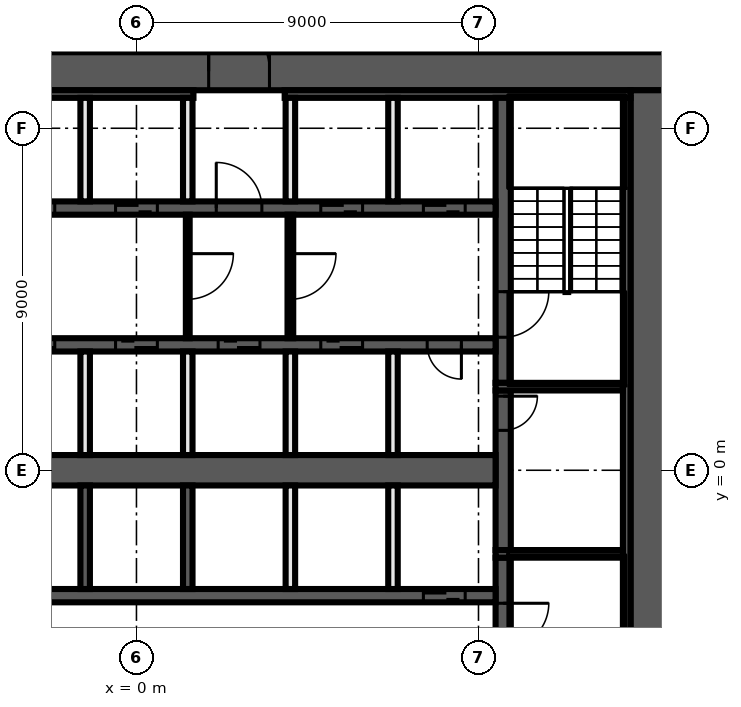
"""IFC4 building model, lengths in metres.
Left out: names, types, materials, properties, quantities, classifications, styles, units other than length and angle.
Written with IfcOpenShell. Run it as: python <this file> out.ifc"""

import sys

from ifc_helpers import new_model, si_unit, direction, frame, frame_2d, origin, place, context, subcontext, project, spatial, rectangle, extrude, element, fill, save


model = new_model("IFC4")
c1 = context("Model", 3, precision=1e-05, world=origin(), true_north=direction((0.0, 1.0)))
c2 = subcontext(c1, "Body", "Model", "MODEL_VIEW")
j1 = project(units=[si_unit("LENGTHUNIT", "METRE"), si_unit("PLANEANGLEUNIT", "RADIAN")], contexts=[c1])
p1 = place(None, origin())
s1 = spatial("IfcSite", under=j1, at=p1, CompositionType="ELEMENT")
p2 = place(p1, origin())
s2 = spatial("IfcBuilding", under=s1, at=p2, CompositionType="ELEMENT")
p3 = place(p2, frame((0.0, 0.0, 145.6)))
s3 = spatial("IfcBuildingStorey", under=s2, at=p3, CompositionType="ELEMENT", Elevation=145.6)
p4 = place(p3, frame((-14.0, 10.5, 0.0), z_axis=(0.0, 0.0, 1.0), x_axis=(1.0, 0.0, 0.0)))
e1 = element("IfcWall", 1, at=p4, inside=s3, PredefinedType="SHEAR", context=c2, shape_type="SweptSolid", body=[
    extrude(rectangle(XDim=28.0, YDim=1.0, at=frame_2d((14.0, 0.0))), origin(), (0.0, 0.0, 1.0), 5.55),
])
p5 = place(p4, frame((15.9, 0.0, 0.0)))
e2 = element("IfcOpeningElement", 2, at=p5, cuts=e1, PredefinedType="OPENING", context=c2, shape_type="SweptSolid", body=[
    extrude(rectangle(XDim=1.6, YDim=2.1, at=frame_2d((0.8, 1.05))), frame((0.0, 0.51, 0.0), z_axis=(0.0, -1.0, 0.0), x_axis=(1.0, 0.0, 0.0)), (0.0, 0.0, 1.0), 1.02),
])
p6 = place(p3, frame((13.5, 10.0, 0.0), z_axis=(0.0, 0.0, 1.0), x_axis=(0.0, -1.0, 0.0)))
e3 = element("IfcWall", 3, at=p6, inside=s3, PredefinedType="SHEAR", context=c2, shape_type="SweptSolid", body=[
    extrude(rectangle(XDim=20.0, YDim=1.0, at=frame_2d((10.0, 0.0))), origin(), (0.0, 0.0, 1.0), 5.55),
])
p7 = place(p3, frame((-13.0, 9.9, 0.0), z_axis=(0.0, 0.0, 1.0), x_axis=(1.0, 0.0, 0.0)))
e4 = element("IfcWall", 4, at=p7, inside=s3, PredefinedType="SHEAR", context=c2, shape_type="SweptSolid", body=[
    extrude(rectangle(XDim=14.5, YDim=0.2, at=frame_2d((7.25, 0.0))), origin(), (0.0, 0.0, 1.0), 5.55),
])
p8 = place(p3, frame((3.9, 9.9, 0.0), z_axis=(0.0, 0.0, 1.0), x_axis=(1.0, 0.0, 0.0)))
e5 = element("IfcWall", 5, at=p8, inside=s3, PredefinedType="SHEAR", context=c2, shape_type="SweptSolid", body=[
    extrude(rectangle(XDim=9.1, YDim=0.2, at=frame_2d((4.55, 0.0))), origin(), (0.0, 0.0, 1.0), 5.55),
])
p9 = place(p3, frame((12.9, 9.8, 0.0), z_axis=(0.0, 0.0, 1.0), x_axis=(0.0, -1.0, 0.0)))
e6 = element("IfcWall", 6, at=p9, inside=s3, PredefinedType="SHEAR", context=c2, shape_type="SweptSolid", body=[
    extrude(rectangle(XDim=19.6, YDim=0.2, at=frame_2d((9.8, 0.0))), origin(), (0.0, 0.0, 1.0), 5.55),
])
p10 = place(p3, frame((9.65, -2.3, 0.0), z_axis=(0.0, 0.0, 1.0), x_axis=(0.0, -1.0, 0.0)))
e7 = element("IfcWall", 7, at=p10, inside=s3, PredefinedType="SHEAR", context=c2, shape_type="SweptSolid", body=[
    extrude(rectangle(XDim=7.5, YDim=0.4, at=frame_2d((3.75, 0.0))), origin(), (0.0, 0.0, 1.0), 5.55),
])
p11 = place(p10, frame((1.2, 0.0, 0.0)))
e8 = element("IfcOpeningElement", 8, at=p11, cuts=e7, PredefinedType="OPENING", context=c2, shape_type="SweptSolid", body=[
    extrude(rectangle(XDim=1.2, YDim=2.1, at=frame_2d((0.6, 1.05))), frame((0.0, 0.21, 0.0), z_axis=(0.0, -1.0, 0.0), x_axis=(1.0, 0.0, 0.0)), (0.0, 0.0, 1.0), 0.42),
])
p12 = place(p3, frame((9.65, 2.1, 0.0), z_axis=(0.0, 0.0, 1.0), x_axis=(0.0, -1.0, 0.0)))
e9 = element("IfcWall", 9, at=p12, inside=s3, PredefinedType="SHEAR", context=c2, shape_type="SweptSolid", body=[
    extrude(rectangle(XDim=4.2, YDim=0.4, at=frame_2d((2.1, 0.0))), origin(), (0.0, 0.0, 1.0), 5.55),
])
p13 = place(p12, frame((0.15, 0.0, 0.0)))
e10 = element("IfcOpeningElement", 10, at=p13, cuts=e9, PredefinedType="OPENING", context=c2, shape_type="SweptSolid", body=[
    extrude(rectangle(XDim=0.9, YDim=2.1, at=frame_2d((0.45, 1.05))), frame((0.0, 0.21, 0.0), z_axis=(0.0, -1.0, 0.0), x_axis=(1.0, 0.0, 0.0)), (0.0, 0.0, 1.0), 0.42),
])
p14 = place(p3, frame((9.65, 9.8, 0.0), z_axis=(0.0, 0.0, 1.0), x_axis=(0.0, -1.0, 0.0)))
e11 = element("IfcWall", 11, at=p14, inside=s3, PredefinedType="SHEAR", context=c2, shape_type="SweptSolid", body=[
    extrude(rectangle(XDim=7.5, YDim=0.4, at=frame_2d((3.75, 0.0))), origin(), (0.0, 0.0, 1.0), 5.55),
])
p15 = place(p14, frame((5.1, 0.0, 0.0)))
e12 = element("IfcOpeningElement", 12, at=p15, cuts=e11, PredefinedType="OPENING", context=c2, shape_type="SweptSolid", body=[
    extrude(rectangle(XDim=1.2, YDim=2.1, at=frame_2d((0.6, 1.05))), frame((0.0, 0.21, 0.0), z_axis=(0.0, -1.0, 0.0), x_axis=(1.0, 0.0, 0.0)), (0.0, 0.0, 1.0), 0.42),
])
for number, where, z_axis, x_axis in (
    (13, (9.45, 2.2, 0.0), (0.0, 0.0, 1.0), (1.0, 0.0, 0.0)),
    (14, (9.45, -2.2, 0.0), (0.0, 0.0, 1.0), (1.0, 0.0, 0.0)),
):
    element("IfcWall", number, at=place(p3, frame(where, z_axis=z_axis, x_axis=x_axis)), inside=s3, PredefinedType="SHEAR", context=c2, shape_type="SweptSolid", body=[
        extrude(rectangle(XDim=3.35, YDim=0.2, at=frame_2d((1.675, 0.0))), origin(), (0.0, 0.0, 1.0), 5.55),
    ])
p16 = place(p3, frame((-9.45, 6.9, 0.0), z_axis=(0.0, 0.0, 1.0), x_axis=(1.0, 0.0, 0.0)))
e15 = element("IfcWall", 15, at=p16, inside=s3, PredefinedType="SHEAR", context=c2, shape_type="SweptSolid", body=[
    extrude(rectangle(XDim=18.9, YDim=0.35, at=frame_2d((9.45, 0.0))), origin(), (0.0, 0.0, 1.0), 5.55),
])
p17 = place(p16, frame((0.8, 0.0, 0.0)))
e16 = element("IfcOpeningElement", 16, at=p17, cuts=e15, PredefinedType="OPENING", context=c2, shape_type="SweptSolid", body=[
    extrude(rectangle(XDim=1.1, YDim=2.1, at=frame_2d((0.55, 1.05))), frame((0.0, 0.185, 0.0), z_axis=(0.0, -1.0, 0.0), x_axis=(1.0, 0.0, 0.0)), (0.0, 0.0, 1.0), 0.37),
])
p18 = place(p16, frame((3.5, 0.0, 0.0)))
e17 = element("IfcOpeningElement", 17, at=p18, cuts=e15, PredefinedType="OPENING", context=c2, shape_type="SweptSolid", body=[
    extrude(rectangle(XDim=1.1, YDim=2.1, at=frame_2d((0.55, 1.05))), frame((0.0, 0.185, 0.0), z_axis=(0.0, -1.0, 0.0), x_axis=(1.0, 0.0, 0.0)), (0.0, 0.0, 1.0), 0.37),
])
p19 = place(p16, frame((6.2, 0.0, 0.0)))
e18 = element("IfcOpeningElement", 18, at=p19, cuts=e15, PredefinedType="OPENING", context=c2, shape_type="SweptSolid", body=[
    extrude(rectangle(XDim=1.1, YDim=2.1, at=frame_2d((0.55, 1.05))), frame((0.0, 0.185, 0.0), z_axis=(0.0, -1.0, 0.0), x_axis=(1.0, 0.0, 0.0)), (0.0, 0.0, 1.0), 0.37),
])
p20 = place(p16, frame((8.9, 0.0, 0.0)))
e19 = element("IfcOpeningElement", 19, at=p20, cuts=e15, PredefinedType="OPENING", context=c2, shape_type="SweptSolid", body=[
    extrude(rectangle(XDim=1.1, YDim=2.1, at=frame_2d((0.55, 1.05))), frame((0.0, 0.185, 0.0), z_axis=(0.0, -1.0, 0.0), x_axis=(1.0, 0.0, 0.0)), (0.0, 0.0, 1.0), 0.37),
])
p21 = place(p16, frame((11.55, 0.0, 0.0)))
e20 = element("IfcOpeningElement", 20, at=p21, cuts=e15, PredefinedType="OPENING", context=c2, shape_type="SweptSolid", body=[
    extrude(rectangle(XDim=1.2, YDim=2.1, at=frame_2d((0.6, 1.05))), frame((0.0, 0.185, 0.0), z_axis=(0.0, -1.0, 0.0), x_axis=(1.0, 0.0, 0.0)), (0.0, 0.0, 1.0), 0.37),
])
p22 = place(p16, frame((14.3, 0.0, 0.0)))
e21 = element("IfcOpeningElement", 21, at=p22, cuts=e15, PredefinedType="OPENING", context=c2, shape_type="SweptSolid", body=[
    extrude(rectangle(XDim=1.1, YDim=2.1, at=frame_2d((0.55, 1.05))), frame((0.0, 0.185, 0.0), z_axis=(0.0, -1.0, 0.0), x_axis=(1.0, 0.0, 0.0)), (0.0, 0.0, 1.0), 0.37),
])
p23 = place(p16, frame((17.0, 0.0, 0.0)))
e22 = element("IfcOpeningElement", 22, at=p23, cuts=e15, PredefinedType="OPENING", context=c2, shape_type="SweptSolid", body=[
    extrude(rectangle(XDim=1.1, YDim=2.1, at=frame_2d((0.55, 1.05))), frame((0.0, 0.185, 0.0), z_axis=(0.0, -1.0, 0.0), x_axis=(1.0, 0.0, 0.0)), (0.0, 0.0, 1.0), 0.37),
])
p24 = place(p3, frame((9.45, 3.3, 0.0), z_axis=(0.0, 0.0, 1.0), x_axis=(-1.0, 0.0, 0.0)))
e23 = element("IfcWall", 23, at=p24, inside=s3, PredefinedType="SHEAR", context=c2, shape_type="SweptSolid", body=[
    extrude(rectangle(XDim=18.9, YDim=0.35, at=frame_2d((9.45, 0.0))), origin(), (0.0, 0.0, 1.0), 5.55),
])
p25 = place(p24, frame((17.0, 0.0, 0.0)))
e24 = element("IfcOpeningElement", 24, at=p25, cuts=e23, PredefinedType="OPENING", context=c2, shape_type="SweptSolid", body=[
    extrude(rectangle(XDim=1.1, YDim=2.1, at=frame_2d((0.55, 1.05))), frame((0.0, 0.185, 0.0), z_axis=(0.0, -1.0, 0.0), x_axis=(1.0, 0.0, 0.0)), (0.0, 0.0, 1.0), 0.37),
])
p26 = place(p24, frame((14.3, 0.0, 0.0)))
e25 = element("IfcOpeningElement", 25, at=p26, cuts=e23, PredefinedType="OPENING", context=c2, shape_type="SweptSolid", body=[
    extrude(rectangle(XDim=1.1, YDim=2.1, at=frame_2d((0.55, 1.05))), frame((0.0, 0.185, 0.0), z_axis=(0.0, -1.0, 0.0), x_axis=(1.0, 0.0, 0.0)), (0.0, 0.0, 1.0), 0.37),
])
p27 = place(p24, frame((11.6, 0.0, 0.0)))
e26 = element("IfcOpeningElement", 26, at=p27, cuts=e23, PredefinedType="OPENING", context=c2, shape_type="SweptSolid", body=[
    extrude(rectangle(XDim=1.1, YDim=2.1, at=frame_2d((0.55, 1.05))), frame((0.0, 0.185, 0.0), z_axis=(0.0, -1.0, 0.0), x_axis=(1.0, 0.0, 0.0)), (0.0, 0.0, 1.0), 0.37),
])
p28 = place(p24, frame((8.9, 0.0, 0.0)))
e27 = element("IfcOpeningElement", 27, at=p28, cuts=e23, PredefinedType="OPENING", context=c2, shape_type="SweptSolid", body=[
    extrude(rectangle(XDim=1.1, YDim=2.1, at=frame_2d((0.55, 1.05))), frame((0.0, 0.185, 0.0), z_axis=(0.0, -1.0, 0.0), x_axis=(1.0, 0.0, 0.0)), (0.0, 0.0, 1.0), 0.37),
])
p29 = place(p24, frame((6.2, 0.0, 0.0)))
e28 = element("IfcOpeningElement", 28, at=p29, cuts=e23, PredefinedType="OPENING", context=c2, shape_type="SweptSolid", body=[
    extrude(rectangle(XDim=1.1, YDim=2.1, at=frame_2d((0.55, 1.05))), frame((0.0, 0.185, 0.0), z_axis=(0.0, -1.0, 0.0), x_axis=(1.0, 0.0, 0.0)), (0.0, 0.0, 1.0), 0.37),
])
p30 = place(p24, frame((3.5, 0.0, 0.0)))
e29 = element("IfcOpeningElement", 29, at=p30, cuts=e23, PredefinedType="OPENING", context=c2, shape_type="SweptSolid", body=[
    extrude(rectangle(XDim=1.1, YDim=2.1, at=frame_2d((0.55, 1.05))), frame((0.0, 0.185, 0.0), z_axis=(0.0, -1.0, 0.0), x_axis=(1.0, 0.0, 0.0)), (0.0, 0.0, 1.0), 0.37),
])
p31 = place(p24, frame((0.9, 0.0, 0.0)))
e30 = element("IfcOpeningElement", 30, at=p31, cuts=e23, PredefinedType="OPENING", context=c2, shape_type="SweptSolid", body=[
    extrude(rectangle(XDim=0.9, YDim=2.1, at=frame_2d((0.45, 1.05))), frame((0.0, 0.185, 0.0), z_axis=(0.0, -1.0, 0.0), x_axis=(1.0, 0.0, 0.0)), (0.0, 0.0, 1.0), 0.37),
])
p32 = place(p3, frame((-9.45, -3.3, 0.0), z_axis=(0.0, 0.0, 1.0), x_axis=(1.0, 0.0, 0.0)))
e31 = element("IfcWall", 31, at=p32, inside=s3, PredefinedType="SHEAR", context=c2, shape_type="SweptSolid", body=[
    extrude(rectangle(XDim=18.9, YDim=0.35, at=frame_2d((9.45, 0.0))), origin(), (0.0, 0.0, 1.0), 5.55),
])
p33 = place(p32, frame((17.0, 0.0, 0.0)))
e32 = element("IfcOpeningElement", 32, at=p33, cuts=e31, PredefinedType="OPENING", context=c2, shape_type="SweptSolid", body=[
    extrude(rectangle(XDim=1.1, YDim=2.1, at=frame_2d((0.55, 1.05))), frame((0.0, 0.185, 0.0), z_axis=(0.0, -1.0, 0.0), x_axis=(1.0, 0.0, 0.0)), (0.0, 0.0, 1.0), 0.37),
])
p34 = place(p3, frame((-9.45, 0.0, 0.0), z_axis=(0.0, 0.0, 1.0), x_axis=(1.0, 0.0, 0.0)))
e33 = element("IfcWall", 33, at=p34, inside=s3, PredefinedType="SHEAR", context=c2, shape_type="SweptSolid", body=[
    extrude(rectangle(XDim=18.9, YDim=0.8, at=frame_2d((9.45, 0.0))), origin(), (0.0, 0.0, 1.0), 5.55),
])
for number, where, z_axis, x_axis in (
    (34, (6.75, -3.125, 0.0), (0.0, 0.0, 1.0), (0.0, 1.0, 0.0)),
    (35, (6.75, 0.4, 0.0), (0.0, 0.0, 1.0), (0.0, 1.0, 0.0)),
    (36, (6.75, 7.075, 0.0), (0.0, 0.0, 1.0), (0.0, 1.0, 0.0)),
):
    element("IfcWall", number, at=place(p3, frame(where, z_axis=z_axis, x_axis=x_axis)), inside=s3, PredefinedType="SOLIDWALL", context=c2, shape_type="SweptSolid", body=[
        extrude(rectangle(XDim=2.725, YDim=0.25, at=frame_2d((1.363, 0.0))), origin(), (0.0, 0.0, 1.0), 5.55),
    ])
p35 = place(p3, frame((4.05, 6.725, 0.0), z_axis=(0.0, 0.0, 1.0), x_axis=(0.0, -1.0, 0.0)))
e37 = element("IfcWall", 37, at=p35, inside=s3, PredefinedType="PARTITIONING", context=c2, shape_type="SweptSolid", body=[
    extrude(rectangle(XDim=3.25, YDim=0.15, at=frame_2d((1.625, 0.0))), origin(), (0.0, 0.0, 1.0), 5.55),
])
p36 = place(p35, frame((1.025, 0.0, 0.0)))
e38 = element("IfcOpeningElement", 38, at=p36, cuts=e37, PredefinedType="OPENING", context=c2, shape_type="SweptSolid", body=[
    extrude(rectangle(XDim=1.2, YDim=2.1, at=frame_2d((0.6, 1.05))), frame((0.0, 0.085, 0.0), z_axis=(0.0, -1.0, 0.0), x_axis=(1.0, 0.0, 0.0)), (0.0, 0.0, 1.0), 0.17),
])
for number, where, z_axis, x_axis in (
    (39, (4.05, -3.125, 0.0), (0.0, 0.0, 1.0), (0.0, 1.0, 0.0)),
    (40, (4.05, 0.4, 0.0), (0.0, 0.0, 1.0), (0.0, 1.0, 0.0)),
    (41, (4.05, 7.075, 0.0), (0.0, 0.0, 1.0), (0.0, 1.0, 0.0)),
):
    element("IfcWall", number, at=place(p3, frame(where, z_axis=z_axis, x_axis=x_axis)), inside=s3, PredefinedType="SOLIDWALL", context=c2, shape_type="SweptSolid", body=[
        extrude(rectangle(XDim=2.725, YDim=0.25, at=frame_2d((1.363, 0.0))), origin(), (0.0, 0.0, 1.0), 5.55),
    ])
p37 = place(p3, frame((1.35, 6.725, 0.0), z_axis=(0.0, 0.0, 1.0), x_axis=(0.0, -1.0, 0.0)))
e42 = element("IfcWall", 42, at=p37, inside=s3, PredefinedType="PARTITIONING", context=c2, shape_type="SweptSolid", body=[
    extrude(rectangle(XDim=3.25, YDim=0.1, at=frame_2d((1.625, 0.0))), origin(), (0.0, 0.0, 1.0), 5.55),
])
p38 = place(p37, frame((1.025, 0.0, 0.0)))
e43 = element("IfcOpeningElement", 43, at=p38, cuts=e42, PredefinedType="OPENING", context=c2, shape_type="SweptSolid", body=[
    extrude(rectangle(XDim=1.2, YDim=2.1, at=frame_2d((0.6, 1.05))), frame((0.0, 0.06, 0.0), z_axis=(0.0, -1.0, 0.0), x_axis=(1.0, 0.0, 0.0)), (0.0, 0.0, 1.0), 0.12),
])
p39 = place(p3, frame((1.35, -3.125, 0.0), z_axis=(0.0, 0.0, 1.0), x_axis=(0.0, 1.0, 0.0)))
e44 = element("IfcWall", 44, at=p39, inside=s3, PredefinedType="SHEAR", context=c2, shape_type="SweptSolid", body=[
    extrude(rectangle(XDim=2.725, YDim=0.25, at=frame_2d((1.363, 0.0))), origin(), (0.0, 0.0, 1.0), 5.55),
])
for number, where, z_axis, x_axis in (
    (45, (1.35, 0.4, 0.0), (0.0, 0.0, 1.0), (0.0, 1.0, 0.0)),
    (46, (1.35, 7.075, 0.0), (0.0, 0.0, 1.0), (0.0, 1.0, 0.0)),
):
    element("IfcWall", number, at=place(p3, frame(where, z_axis=z_axis, x_axis=x_axis)), inside=s3, PredefinedType="SOLIDWALL", context=c2, shape_type="SweptSolid", body=[
        extrude(rectangle(XDim=2.725, YDim=0.25, at=frame_2d((1.363, 0.0))), origin(), (0.0, 0.0, 1.0), 5.55),
    ])
p40 = place(p3, frame((-1.35, -3.125, 0.0), z_axis=(0.0, 0.0, 1.0), x_axis=(0.0, 1.0, 0.0)))
e47 = element("IfcWall", 47, at=p40, inside=s3, PredefinedType="SHEAR", context=c2, shape_type="SweptSolid", body=[
    extrude(rectangle(XDim=2.725, YDim=0.25, at=frame_2d((1.363, 0.0))), origin(), (0.0, 0.0, 1.0), 5.55),
])
for number, where, z_axis, x_axis in (
    (48, (-1.35, 0.4, 0.0), (0.0, 0.0, 1.0), (0.0, 1.0, 0.0)),
    (49, (-1.35, 7.075, 0.0), (0.0, 0.0, 1.0), (0.0, 1.0, 0.0)),
):
    element("IfcWall", number, at=place(p3, frame(where, z_axis=z_axis, x_axis=x_axis)), inside=s3, PredefinedType="SOLIDWALL", context=c2, shape_type="SweptSolid", body=[
        extrude(rectangle(XDim=2.725, YDim=0.25, at=frame_2d((1.363, 0.0))), origin(), (0.0, 0.0, 1.0), 5.55),
    ])
p41 = place(p13, origin())
e50 = element("IfcDoor", 50, at=p41, inside=s3, OperationType="SINGLE_SWING_RIGHT", PredefinedType="DOOR", context=c2, shape_type="SweptSolid", body=[
    extrude(rectangle(XDim=0.9, YDim=2.1, at=frame_2d((0.45, 1.05))), frame((0.0, 0.025, 0.0), z_axis=(0.0, -1.0, 0.0), x_axis=(1.0, 0.0, 0.0)), (0.0, 0.0, 1.0), 0.05),
])
fill(e10, e50)
p42 = place(p19, origin())
e51 = element("IfcDoor", 51, at=p42, inside=s3, OperationType="DOUBLE_DOOR_SLIDING", PredefinedType="DOOR", context=c2, shape_type="SweptSolid", body=[
    extrude(rectangle(XDim=1.1, YDim=2.1, at=frame_2d((0.55, 1.05))), frame((0.0, 0.025, 0.0), z_axis=(0.0, -1.0, 0.0), x_axis=(1.0, 0.0, 0.0)), (0.0, 0.0, 1.0), 0.05),
])
fill(e18, e51)
p43 = place(p20, origin())
e52 = element("IfcDoor", 52, at=p43, inside=s3, OperationType="DOUBLE_DOOR_SLIDING", PredefinedType="DOOR", context=c2, shape_type="SweptSolid", body=[
    extrude(rectangle(XDim=1.1, YDim=2.1, at=frame_2d((0.55, 1.05))), frame((0.0, 0.025, 0.0), z_axis=(0.0, -1.0, 0.0), x_axis=(1.0, 0.0, 0.0)), (0.0, 0.0, 1.0), 0.05),
])
fill(e19, e52)
p44 = place(p5, origin())
e53 = element("IfcDoor", 53, at=p44, inside=s3, OperationType="DOUBLE_DOOR_SINGLE_SWING", PredefinedType="DOOR", context=c2, shape_type="SweptSolid", body=[
    extrude(rectangle(XDim=1.6, YDim=2.1, at=frame_2d((0.8, 1.05))), frame((0.0, 0.025, 0.0), z_axis=(0.0, -1.0, 0.0), x_axis=(1.0, 0.0, 0.0)), (0.0, 0.0, 1.0), 0.05),
])
fill(e2, e53)
p45 = place(p21, origin())
e54 = element("IfcDoor", 54, at=p45, inside=s3, OperationType="SINGLE_SWING_LEFT", PredefinedType="DOOR", context=c2, shape_type="SweptSolid", body=[
    extrude(rectangle(XDim=1.2, YDim=2.1, at=frame_2d((0.6, 1.05))), frame((0.0, 0.025, 0.0), z_axis=(0.0, -1.0, 0.0), x_axis=(1.0, 0.0, 0.0)), (0.0, 0.0, 1.0), 0.05),
])
fill(e20, e54)
p46 = place(p22, origin())
e55 = element("IfcDoor", 55, at=p46, inside=s3, OperationType="DOUBLE_DOOR_SLIDING", PredefinedType="DOOR", context=c2, shape_type="SweptSolid", body=[
    extrude(rectangle(XDim=1.1, YDim=2.1, at=frame_2d((0.55, 1.05))), frame((0.0, 0.025, 0.0), z_axis=(0.0, -1.0, 0.0), x_axis=(1.0, 0.0, 0.0)), (0.0, 0.0, 1.0), 0.05),
])
fill(e21, e55)
p47 = place(p23, origin())
e56 = element("IfcDoor", 56, at=p47, inside=s3, OperationType="DOUBLE_DOOR_SLIDING", PredefinedType="DOOR", context=c2, shape_type="SweptSolid", body=[
    extrude(rectangle(XDim=1.1, YDim=2.1, at=frame_2d((0.55, 1.05))), frame((0.0, 0.025, 0.0), z_axis=(0.0, -1.0, 0.0), x_axis=(1.0, 0.0, 0.0)), (0.0, 0.0, 1.0), 0.05),
])
fill(e22, e56)
p48 = place(p27, origin())
e57 = element("IfcDoor", 57, at=p48, inside=s3, OperationType="DOUBLE_DOOR_SLIDING", PredefinedType="DOOR", context=c2, shape_type="SweptSolid", body=[
    extrude(rectangle(XDim=1.1, YDim=2.1, at=frame_2d((0.55, 1.05))), frame((0.0, 0.025, 0.0), z_axis=(0.0, -1.0, 0.0), x_axis=(1.0, 0.0, 0.0)), (0.0, 0.0, 1.0), 0.05),
])
fill(e26, e57)
p49 = place(p28, origin())
e58 = element("IfcDoor", 58, at=p49, inside=s3, OperationType="DOUBLE_DOOR_SLIDING", PredefinedType="DOOR", context=c2, shape_type="SweptSolid", body=[
    extrude(rectangle(XDim=1.1, YDim=2.1, at=frame_2d((0.55, 1.05))), frame((0.0, 0.025, 0.0), z_axis=(0.0, -1.0, 0.0), x_axis=(1.0, 0.0, 0.0)), (0.0, 0.0, 1.0), 0.05),
])
fill(e27, e58)
p50 = place(p29, origin())
e59 = element("IfcDoor", 59, at=p50, inside=s3, OperationType="DOUBLE_DOOR_SLIDING", PredefinedType="DOOR", context=c2, shape_type="SweptSolid", body=[
    extrude(rectangle(XDim=1.1, YDim=2.1, at=frame_2d((0.55, 1.05))), frame((0.0, 0.025, 0.0), z_axis=(0.0, -1.0, 0.0), x_axis=(1.0, 0.0, 0.0)), (0.0, 0.0, 1.0), 0.05),
])
fill(e28, e59)
p51 = place(p30, origin())
e60 = element("IfcDoor", 60, at=p51, inside=s3, OperationType="DOUBLE_DOOR_SLIDING", PredefinedType="DOOR", context=c2, shape_type="SweptSolid", body=[
    extrude(rectangle(XDim=1.1, YDim=2.1, at=frame_2d((0.55, 1.05))), frame((0.0, 0.025, 0.0), z_axis=(0.0, -1.0, 0.0), x_axis=(1.0, 0.0, 0.0)), (0.0, 0.0, 1.0), 0.05),
])
fill(e29, e60)
p52 = place(p31, origin())
e61 = element("IfcDoor", 61, at=p52, inside=s3, OperationType="SINGLE_SWING_LEFT", PredefinedType="DOOR", context=c2, shape_type="SweptSolid", body=[
    extrude(rectangle(XDim=0.9, YDim=2.1, at=frame_2d((0.45, 1.05))), frame((0.0, 0.025, 0.0), z_axis=(0.0, -1.0, 0.0), x_axis=(1.0, 0.0, 0.0)), (0.0, 0.0, 1.0), 0.05),
])
fill(e30, e61)
p53 = place(p33, origin())
e62 = element("IfcDoor", 62, at=p53, inside=s3, OperationType="DOUBLE_DOOR_SLIDING", PredefinedType="DOOR", context=c2, shape_type="SweptSolid", body=[
    extrude(rectangle(XDim=1.1, YDim=2.1, at=frame_2d((0.55, 1.05))), frame((0.0, 0.025, 0.0), z_axis=(0.0, -1.0, 0.0), x_axis=(1.0, 0.0, 0.0)), (0.0, 0.0, 1.0), 0.05),
])
fill(e32, e62)
p54 = place(p15, origin())
e63 = element("IfcDoor", 63, at=p54, inside=s3, OperationType="SINGLE_SWING_LEFT", PredefinedType="DOOR", context=c2, shape_type="SweptSolid", body=[
    extrude(rectangle(XDim=1.2, YDim=2.1, at=frame_2d((0.6, 1.05))), frame((0.0, 0.025, 0.0), z_axis=(0.0, -1.0, 0.0), x_axis=(1.0, 0.0, 0.0)), (0.0, 0.0, 1.0), 0.05),
])
fill(e12, e63)
p55 = place(p11, origin())
e64 = element("IfcDoor", 64, at=p55, inside=s3, OperationType="SINGLE_SWING_RIGHT", PredefinedType="DOOR", context=c2, shape_type="SweptSolid", body=[
    extrude(rectangle(XDim=1.2, YDim=2.1, at=frame_2d((0.6, 1.05))), frame((0.0, 0.025, 0.0), z_axis=(0.0, -1.0, 0.0), x_axis=(1.0, 0.0, 0.0)), (0.0, 0.0, 1.0), 0.05),
])
fill(e8, e64)
p56 = place(p38, origin())
e65 = element("IfcDoor", 65, at=p56, inside=s3, OperationType="SINGLE_SWING_LEFT", PredefinedType="DOOR", context=c2, shape_type="SweptSolid", body=[
    extrude(rectangle(XDim=1.2, YDim=2.1, at=frame_2d((0.6, 1.05))), frame((0.0, 0.025, 0.0), z_axis=(0.0, -1.0, 0.0), x_axis=(1.0, 0.0, 0.0)), (0.0, 0.0, 1.0), 0.05),
])
fill(e43, e65)
p57 = place(p36, origin())
e66 = element("IfcDoor", 66, at=p57, inside=s3, OperationType="SINGLE_SWING_RIGHT", PredefinedType="DOOR", context=c2, shape_type="SweptSolid", body=[
    extrude(rectangle(XDim=1.2, YDim=2.1, at=frame_2d((0.6, 1.05))), frame((0.0, 0.025, 0.0), z_axis=(0.0, -1.0, 0.0), x_axis=(1.0, 0.0, 0.0)), (0.0, 0.0, 1.0), 0.05),
])
fill(e38, e66)
save(model, sys.argv[1])
